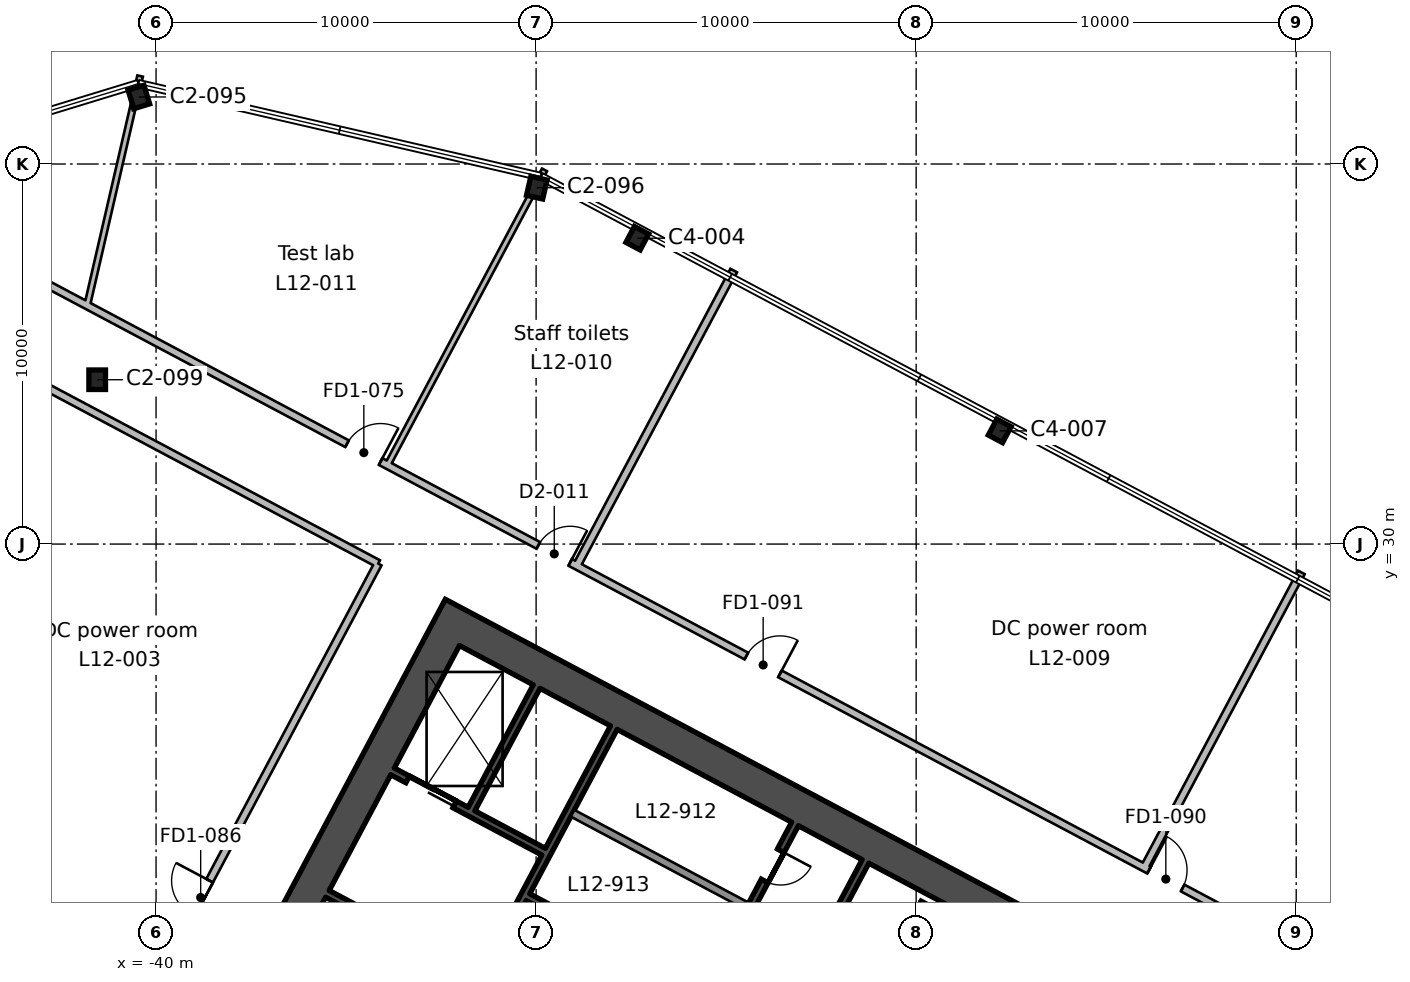
"""IFC4 building model, lengths in metres.
Left out: names, types, materials, properties, quantities, classifications, styles, units other than length and angle.
Written with IfcOpenShell. Run it as: python <this file> out.ifc"""

import sys

from ifc_helpers import new_model, si_unit, direction, frame, frame_2d, origin, origin_2d, place, context, subcontext, project, spatial, rectangle, i_section, extrude, element, fill, save


model = new_model("IFC4")
c1 = context("Model", 3, precision=1e-05, world=origin(), true_north=direction((0.0, 1.0)))
c2 = subcontext(c1, "Body", "Model", "MODEL_VIEW")
j1 = project(units=[si_unit("LENGTHUNIT", "METRE"), si_unit("PLANEANGLEUNIT", "RADIAN")], contexts=[c1])
p1 = place(None, origin())
s1 = spatial("IfcSite", under=j1, at=p1, CompositionType="ELEMENT")
p2 = place(p1, origin())
s2 = spatial("IfcBuilding", under=s1, at=p2, CompositionType="ELEMENT")
p3 = place(p2, frame((0.0, 0.0, 66.2)))
s3 = spatial("IfcBuildingStorey", under=s2, at=p3, CompositionType="ELEMENT", Elevation=66.2)
p4 = place(p3, frame((-17.802, 32.978, 0.0), z_axis=(0.0, 0.0, 1.0), x_axis=(-0.882947592859, 0.469471562786, 0.0)))
e1 = element("IfcColumn", 1, at=p4, inside=s3, PredefinedType="COLUMN", context=c2, shape_type="SweptSolid", body=[
    extrude(i_section(OverallWidth=0.424, OverallDepth=0.475, WebThickness=0.048, FlangeThickness=0.077, FilletRadius=0.015, at=origin_2d()), origin(), (0.0, 0.0, 1.0), 4.6),
])
p5 = place(p3, frame((-41.549, 34.324, 0.0), z_axis=(0.0, 0.0, 1.0), x_axis=(1.0, 0.0, 0.0)))
e2 = element("IfcColumn", 2, at=p5, inside=s3, PredefinedType="COLUMN", context=c2, shape_type="SweptSolid", body=[
    extrude(i_section(OverallWidth=0.437, OverallDepth=0.513, WebThickness=0.061, FlangeThickness=0.097, FilletRadius=0.015, at=origin_2d()), origin(), (0.0, 0.0, 1.0), 4.6),
])
p6 = place(p3, frame((-27.338, 38.048, 0.0), z_axis=(0.0, 0.0, 1.0), x_axis=(-0.882947592859, 0.469471562786, 0.0)))
e3 = element("IfcColumn", 3, at=p6, inside=s3, PredefinedType="COLUMN", context=c2, shape_type="SweptSolid", body=[
    extrude(i_section(OverallWidth=0.424, OverallDepth=0.475, WebThickness=0.048, FlangeThickness=0.077, FilletRadius=0.015, at=origin_2d()), origin(), (0.0, 0.0, 1.0), 4.6),
])
for number, where, z_axis, x_axis in (
    (4, (-29.982, 39.378, 0.0), (0.0, 0.0, 1.0), (-0.974, 0.225, 0.0)),
    (5, (-40.453, 41.764, 0.0), (0.0, 0.0, 1.0), (-0.956, -0.292, 0.0)),
):
    element("IfcColumn", number, at=place(p3, frame(where, z_axis=z_axis, x_axis=x_axis)), inside=s3, PredefinedType="COLUMN", context=c2, shape_type="SweptSolid", body=[
        extrude(i_section(OverallWidth=0.437, OverallDepth=0.513, WebThickness=0.061, FlangeThickness=0.097, FilletRadius=0.015, at=origin_2d()), origin(), (0.0, 0.0, 1.0), 4.6),
    ])
p7 = place(p3, frame((-31.992, 28.336, 0.0), z_axis=(0.0, 0.0, 1.0), x_axis=(-0.46947084998, -0.882947971864, 0.0)))
e6 = element("IfcWall", 6, at=p7, inside=s3, PredefinedType="SHEAR", context=c2, shape_type="SweptSolid", body=[
    extrude(rectangle(XDim=20.0, YDim=0.9, at=frame_2d((10.0, 0.0))), origin(), (0.0, 0.0, 1.0), 4.6),
])
p8 = place(p7, frame((10.6, 0.0, 0.0)))
e7 = element("IfcOpeningElement", 7, at=p8, cuts=e6, PredefinedType="OPENING", context=c2, shape_type="SweptSolid", body=[
    extrude(rectangle(XDim=2.4, YDim=2.4, at=frame_2d((1.2, 1.2))), frame((0.0, 0.46, 0.0), z_axis=(0.0, -1.0, 0.0), x_axis=(1.0, 0.0, 0.0)), (0.0, 0.0, 1.0), 0.92),
])
p9 = place(p3, frame((-13.97, 18.244, 0.0), z_axis=(0.0, 0.0, 1.0), x_axis=(-0.88294509198, 0.469476266226, 0.0)))
e8 = element("IfcWall", 8, at=p9, inside=s3, PredefinedType="SHEAR", context=c2, shape_type="SweptSolid", body=[
    extrude(rectangle(XDim=20.2, YDim=0.9, at=frame_2d((10.1, 0.0))), origin(), (0.0, 0.0, 1.0), 4.6),
])
p10 = place(p3, frame((-21.333, 21.649, 0.0), z_axis=(0.0, 0.0, 1.0), x_axis=(-0.469494272526, -0.882935517501, 0.0)))
e9 = element("IfcWall", 9, at=p10, inside=s3, PredefinedType="SHEAR", context=c2, shape_type="SweptSolid", body=[
    extrude(rectangle(XDim=7.3, YDim=0.2, at=frame_2d((3.65, 0.0))), origin(), (0.0, 0.0, 1.0), 4.6),
])
p11 = place(p10, frame((1.3, 0.0, 0.0)))
e10 = element("IfcOpeningElement", 10, at=p11, cuts=e9, PredefinedType="OPENING", context=c2, shape_type="SweptSolid", body=[
    extrude(rectangle(XDim=1.2, YDim=2.1, at=frame_2d((0.6, 1.05))), frame((0.0, 0.11, 0.0), z_axis=(0.0, -1.0, 0.0), x_axis=(1.0, 0.0, 0.0)), (0.0, 0.0, 1.0), 0.22),
])
p12 = place(p3, frame((-23.188, 22.635, 0.0), z_axis=(0.0, 0.0, 1.0), x_axis=(-0.469454336211, -0.882956752176, 0.0)))
e11 = element("IfcWall", 11, at=p12, inside=s3, PredefinedType="SHEAR", context=c2, shape_type="SweptSolid", body=[
    extrude(rectangle(XDim=7.3, YDim=0.2, at=frame_2d((3.65, 0.0))), origin(), (0.0, 0.0, 1.0), 4.6),
])
p13 = place(p12, frame((0.8, 0.0, 0.0)))
e12 = element("IfcOpeningElement", 12, at=p13, cuts=e11, PredefinedType="OPENING", context=c2, shape_type="SweptSolid", body=[
    extrude(rectangle(XDim=0.9, YDim=2.1, at=frame_2d((0.45, 1.05))), frame((0.0, 0.11, 0.0), z_axis=(0.0, -1.0, 0.0), x_axis=(1.0, 0.0, 0.0)), (0.0, 0.0, 1.0), 0.22),
])
p14 = place(p12, frame((3.3, 0.0, 0.0)))
e13 = element("IfcOpeningElement", 13, at=p14, cuts=e11, PredefinedType="OPENING", context=c2, shape_type="SweptSolid", body=[
    extrude(rectangle(XDim=0.9, YDim=2.1, at=frame_2d((0.45, 1.05))), frame((0.0, 0.11, 0.0), z_axis=(0.0, -1.0, 0.0), x_axis=(1.0, 0.0, 0.0)), (0.0, 0.0, 1.0), 0.22),
])
p15 = place(p3, frame((-27.955, 25.171, 0.0), z_axis=(0.0, 0.0, 1.0), x_axis=(-0.469480409012, -0.88294288918, 0.0)))
e14 = element("IfcWall", 14, at=p15, inside=s3, PredefinedType="SHEAR", context=c2, shape_type="SweptSolid", body=[
    extrude(rectangle(XDim=7.3, YDim=0.2, at=frame_2d((3.65, 0.0))), origin(), (0.0, 0.0, 1.0), 4.6),
])
p16 = place(p3, frame((-29.986, 26.25, 0.0), z_axis=(0.0, 0.0, 1.0), x_axis=(-0.469494272526, -0.882935517501, 0.0)))
e15 = element("IfcWall", 15, at=p16, inside=s3, PredefinedType="SHEAR", context=c2, shape_type="SweptSolid", body=[
    extrude(rectangle(XDim=3.65, YDim=0.2, at=frame_2d((1.825, 0.0))), origin(), (0.0, 0.0, 1.0), 4.6),
])
p17 = place(p3, frame((-24.449, 20.475, 0.0), z_axis=(0.0, 0.0, 1.0), x_axis=(-0.882934506056, 0.469496174655, 0.0)))
e16 = element("IfcWall", 16, at=p17, inside=s3, PredefinedType="SOLIDWALL", context=c2, shape_type="SweptSolid", body=[
    extrude(rectangle(XDim=5.2, YDim=0.2, at=frame_2d((2.6, 0.0))), origin(), (0.0, 0.0, 1.0), 4.6),
])
p18 = place(p3, frame((-29.804, 21.906, 0.0), z_axis=(0.0, 0.0, 1.0), x_axis=(-0.882960433586, 0.469447412093, 0.0)))
e17 = element("IfcWall", 17, at=p18, inside=s3, PredefinedType="SHEAR", context=c2, shape_type="SweptSolid", body=[
    extrude(rectangle(XDim=4.5, YDim=0.2, at=frame_2d((2.25, 0.0))), origin(), (0.0, 0.0, 1.0), 4.6),
])
p19 = place(p18, frame((2.65, 0.0, 0.0)))
e18 = element("IfcOpeningElement", 18, at=p19, cuts=e17, PredefinedType="OPENING", context=c2, shape_type="SweptSolid", body=[
    extrude(rectangle(XDim=1.4, YDim=2.4, at=frame_2d((0.7, 1.2))), frame((0.0, 0.11, 0.0), z_axis=(0.0, -1.0, 0.0), x_axis=(1.0, 0.0, 0.0)), (0.0, 0.0, 1.0), 0.22),
])
p20 = place(p3, frame((-25.623, 18.268, 0.0), z_axis=(0.0, 0.0, 1.0), x_axis=(-0.882953967957, 0.469459572775, 0.0)))
e19 = element("IfcWall", 19, at=p20, inside=s3, PredefinedType="SHEAR", context=c2, shape_type="SweptSolid", body=[
    extrude(rectangle(XDim=5.2, YDim=0.2, at=frame_2d((2.6, 0.0))), origin(), (0.0, 0.0, 1.0), 4.6),
])
p21 = place(p3, frame((-26.662, 16.102, 0.0), z_axis=(0.0, 0.0, 1.0), x_axis=(-0.882940221191, 0.469485426614, 0.0)))
e20 = element("IfcWall", 20, at=p21, inside=s3, PredefinedType="SHEAR", context=c2, shape_type="SweptSolid", body=[
    extrude(rectangle(XDim=10.0, YDim=0.2, at=frame_2d((5.0, 0.0))), origin(), (0.0, 0.0, 1.0), 4.6),
])
p22 = place(p21, frame((6.3, 0.0, 0.0)))
e21 = element("IfcOpeningElement", 21, at=p22, cuts=e20, PredefinedType="OPENING", context=c2, shape_type="SweptSolid", body=[
    extrude(rectangle(XDim=1.2, YDim=2.1, at=frame_2d((0.6, 1.05))), frame((0.0, 0.11, 0.0), z_axis=(0.0, -1.0, 0.0), x_axis=(1.0, 0.0, 0.0)), (0.0, 0.0, 1.0), 0.22),
])
p23 = place(p21, frame((0.36, 0.0, 0.0)))
e22 = element("IfcOpeningElement", 22, at=p23, cuts=e20, PredefinedType="OPENING", context=c2, shape_type="SweptSolid", body=[
    extrude(rectangle(XDim=0.9, YDim=2.1, at=frame_2d((0.45, 1.05))), frame((0.0, 0.11, 0.0), z_axis=(0.0, -1.0, 0.0), x_axis=(1.0, 0.0, 0.0)), (0.0, 0.0, 1.0), 0.22),
])
p24 = place(p21, frame((3.06, 0.0, 0.0)))
e23 = element("IfcOpeningElement", 23, at=p24, cuts=e20, PredefinedType="OPENING", context=c2, shape_type="SweptSolid", body=[
    extrude(rectangle(XDim=0.9, YDim=2.1, at=frame_2d((0.45, 1.05))), frame((0.0, 0.11, 0.0), z_axis=(0.0, -1.0, 0.0), x_axis=(1.0, 0.0, 0.0)), (0.0, 0.0, 1.0), 0.22),
])
p25 = place(p3, frame((-48.541, 39.854, 0.0), z_axis=(0.0, 0.0, 1.0), x_axis=(0.882945008423, -0.469476423372, 0.0)))
e24 = element("IfcWall", 24, at=p25, inside=s3, PredefinedType="PARTITIONING", context=c2, shape_type="SweptSolid", body=[
    extrude(rectangle(XDim=54.976, YDim=0.2, at=frame_2d((27.488, 0.0))), origin(), (0.0, 0.0, 1.0), 4.2),
])
p26 = place(p25, frame((39.265, 0.0, 0.0)))
e25 = element("IfcOpeningElement", 25, at=p26, cuts=e24, PredefinedType="OPENING", context=c2, shape_type="SweptSolid", body=[
    extrude(rectangle(XDim=1.0, YDim=2.1, at=frame_2d((0.5, 1.05))), frame((0.0, 0.11, 0.0), z_axis=(0.0, -1.0, 0.0), x_axis=(1.0, 0.0, 0.0)), (0.0, 0.0, 1.0), 0.22),
])
p27 = place(p25, frame((27.265, 0.0, 0.0)))
e26 = element("IfcOpeningElement", 26, at=p27, cuts=e24, PredefinedType="OPENING", context=c2, shape_type="SweptSolid", body=[
    extrude(rectangle(XDim=1.0, YDim=2.1, at=frame_2d((0.5, 1.05))), frame((0.0, 0.11, 0.0), z_axis=(0.0, -1.0, 0.0), x_axis=(1.0, 0.0, 0.0)), (0.0, 0.0, 1.0), 0.22),
])
p28 = place(p25, frame((21.065, 0.0, 0.0)))
e27 = element("IfcOpeningElement", 27, at=p28, cuts=e24, PredefinedType="OPENING", context=c2, shape_type="SweptSolid", body=[
    extrude(rectangle(XDim=0.95, YDim=2.1, at=frame_2d((0.475, 1.05))), frame((0.0, 0.11, 0.0), z_axis=(0.0, -1.0, 0.0), x_axis=(1.0, 0.0, 0.0)), (0.0, 0.0, 1.0), 0.22),
])
p29 = place(p25, frame((15.365, 0.0, 0.0)))
e28 = element("IfcOpeningElement", 28, at=p29, cuts=e24, PredefinedType="OPENING", context=c2, shape_type="SweptSolid", body=[
    extrude(rectangle(XDim=1.0, YDim=2.1, at=frame_2d((0.5, 1.05))), frame((0.0, 0.11, 0.0), z_axis=(0.0, -1.0, 0.0), x_axis=(1.0, 0.0, 0.0)), (0.0, 0.0, 1.0), 0.22),
])
p30 = place(p3, frame((-42.984, 34.181, 0.0), z_axis=(0.0, 0.0, 1.0), x_axis=(0.882929457898, -0.469505668097, 0.0)))
e29 = element("IfcWall", 29, at=p30, inside=s3, PredefinedType="PARTITIONING", context=c2, shape_type="SweptSolid", body=[
    extrude(rectangle(XDim=10.0, YDim=0.2, at=frame_2d((5.0, 0.0))), origin(), (0.0, 0.0, 1.0), 4.2),
])
p31 = place(p3, frame((-34.155, 29.486, 0.0), z_axis=(0.0, 0.0, 1.0), x_axis=(-0.469446756585, -0.882960782103, 0.0)))
e30 = element("IfcWall", 30, at=p31, inside=s3, PredefinedType="PARTITIONING", context=c2, shape_type="SweptSolid", body=[
    extrude(rectangle(XDim=20.0, YDim=0.2, at=frame_2d((10.0, 0.0))), origin(), (0.0, 0.0, 1.0), 4.2),
])
p32 = place(p31, frame((9.45, 0.0, 0.0)))
e31 = element("IfcOpeningElement", 31, at=p32, cuts=e30, PredefinedType="OPENING", context=c2, shape_type="SweptSolid", body=[
    extrude(rectangle(XDim=1.0, YDim=2.1, at=frame_2d((0.5, 1.05))), frame((0.0, 0.11, 0.0), z_axis=(0.0, -1.0, 0.0), x_axis=(1.0, 0.0, 0.0)), (0.0, 0.0, 1.0), 0.22),
])
p33 = place(p3, frame((-29.779, 39.846, 0.0), z_axis=(0.0, 0.0, 1.0), x_axis=(-0.469464832647, -0.882951171304, 0.0)))
e32 = element("IfcWall", 32, at=p33, inside=s3, PredefinedType="PARTITIONING", context=c2, shape_type="SweptSolid", body=[
    extrude(rectangle(XDim=8.801, YDim=0.15, at=frame_2d((4.401, 0.0))), origin(), (0.0, 0.0, 1.0), 4.2),
])
p34 = place(p3, frame((-41.813, 36.276, 0.0), z_axis=(0.0, 0.0, 1.0), x_axis=(0.224922797434, 0.974376587975, 0.0)))
e33 = element("IfcWall", 33, at=p34, inside=s3, PredefinedType="PARTITIONING", context=c2, shape_type="SweptSolid", body=[
    extrude(rectangle(XDim=6.198, YDim=0.15, at=frame_2d((3.099, 0.0))), origin(), (0.0, 0.0, 1.0), 4.2),
])
p35 = place(p3, frame((-24.8, 37.197, 0.0), z_axis=(0.0, 0.0, 1.0), x_axis=(-0.469510830369, -0.882926712794, 0.0)))
e34 = element("IfcWall", 34, at=p35, inside=s3, PredefinedType="PARTITIONING", context=c2, shape_type="SweptSolid", body=[
    extrude(rectangle(XDim=8.8, YDim=0.2, at=frame_2d((4.4, 0.0))), origin(), (0.0, 0.0, 1.0), 4.2),
])
p36 = place(p3, frame((-9.864, 29.255, 0.0), z_axis=(0.0, 0.0, 1.0), x_axis=(-0.469457446168, -0.882955098653, 0.0)))
e35 = element("IfcWall", 35, at=p36, inside=s3, PredefinedType="PARTITIONING", context=c2, shape_type="SweptSolid", body=[
    extrude(rectangle(XDim=8.8, YDim=0.2, at=frame_2d((4.4, 0.0))), origin(), (0.0, 0.0, 1.0), 4.2),
])
p37 = place(p19, origin())
e36 = element("IfcDoor", 36, at=p37, inside=s3, OperationType="DOUBLE_DOOR_SLIDING", PredefinedType="DOOR", context=c2, shape_type="SweptSolid", body=[
    extrude(rectangle(XDim=1.4, YDim=2.4, at=frame_2d((0.7, 1.2))), frame((0.0, 0.025, 0.0), z_axis=(0.0, -1.0, 0.0), x_axis=(1.0, 0.0, 0.0)), (0.0, 0.0, 1.0), 0.05),
])
fill(e18, e36)
p38 = place(p13, origin())
e37 = element("IfcDoor", 37, at=p38, inside=s3, OperationType="SINGLE_SWING_LEFT", PredefinedType="DOOR", context=c2, shape_type="SweptSolid", body=[
    extrude(rectangle(XDim=0.9, YDim=2.1, at=frame_2d((0.45, 1.05))), frame((0.0, 0.025, 0.0), z_axis=(0.0, -1.0, 0.0), x_axis=(1.0, 0.0, 0.0)), (0.0, 0.0, 1.0), 0.05),
])
fill(e12, e37)
p39 = place(p32, frame((1.0, 0.0, 0.0), z_axis=(0.0, 0.0, 1.0), x_axis=(-1.0, 0.0, 0.0)))
e38 = element("IfcDoor", 38, at=p39, inside=s3, OperationType="SINGLE_SWING_RIGHT", PredefinedType="DOOR", context=c2, shape_type="SweptSolid", body=[
    extrude(rectangle(XDim=1.0, YDim=2.1, at=frame_2d((0.5, 1.05))), frame((0.0, 0.025, 0.0), z_axis=(0.0, -1.0, 0.0), x_axis=(1.0, 0.0, 0.0)), (0.0, 0.0, 1.0), 0.05),
])
fill(e31, e38)
p40 = place(p26, origin())
e39 = element("IfcDoor", 39, at=p40, inside=s3, OperationType="SINGLE_SWING_LEFT", PredefinedType="DOOR", context=c2, shape_type="SweptSolid", body=[
    extrude(rectangle(XDim=1.0, YDim=2.1, at=frame_2d((0.5, 1.05))), frame((0.0, 0.025, 0.0), z_axis=(0.0, -1.0, 0.0), x_axis=(1.0, 0.0, 0.0)), (0.0, 0.0, 1.0), 0.05),
])
fill(e25, e39)
p41 = place(p27, origin())
e40 = element("IfcDoor", 40, at=p41, inside=s3, OperationType="SINGLE_SWING_RIGHT", PredefinedType="DOOR", context=c2, shape_type="SweptSolid", body=[
    extrude(rectangle(XDim=1.0, YDim=2.1, at=frame_2d((0.5, 1.05))), frame((0.0, 0.025, 0.0), z_axis=(0.0, -1.0, 0.0), x_axis=(1.0, 0.0, 0.0)), (0.0, 0.0, 1.0), 0.05),
])
fill(e26, e40)
p42 = place(p28, origin())
e41 = element("IfcDoor", 41, at=p42, inside=s3, OperationType="SINGLE_SWING_RIGHT", PredefinedType="DOOR", context=c2, shape_type="SweptSolid", body=[
    extrude(rectangle(XDim=0.95, YDim=2.1, at=frame_2d((0.475, 1.05))), frame((0.0, 0.025, 0.0), z_axis=(0.0, -1.0, 0.0), x_axis=(1.0, 0.0, 0.0)), (0.0, 0.0, 1.0), 0.05),
])
fill(e27, e41)
p43 = place(p29, origin())
e42 = element("IfcDoor", 42, at=p43, inside=s3, OperationType="SINGLE_SWING_RIGHT", PredefinedType="DOOR", context=c2, shape_type="SweptSolid", body=[
    extrude(rectangle(XDim=1.0, YDim=2.1, at=frame_2d((0.5, 1.05))), frame((0.0, 0.025, 0.0), z_axis=(0.0, -1.0, 0.0), x_axis=(1.0, 0.0, 0.0)), (0.0, 0.0, 1.0), 0.05),
])
fill(e28, e42)
save(model, sys.argv[1])
